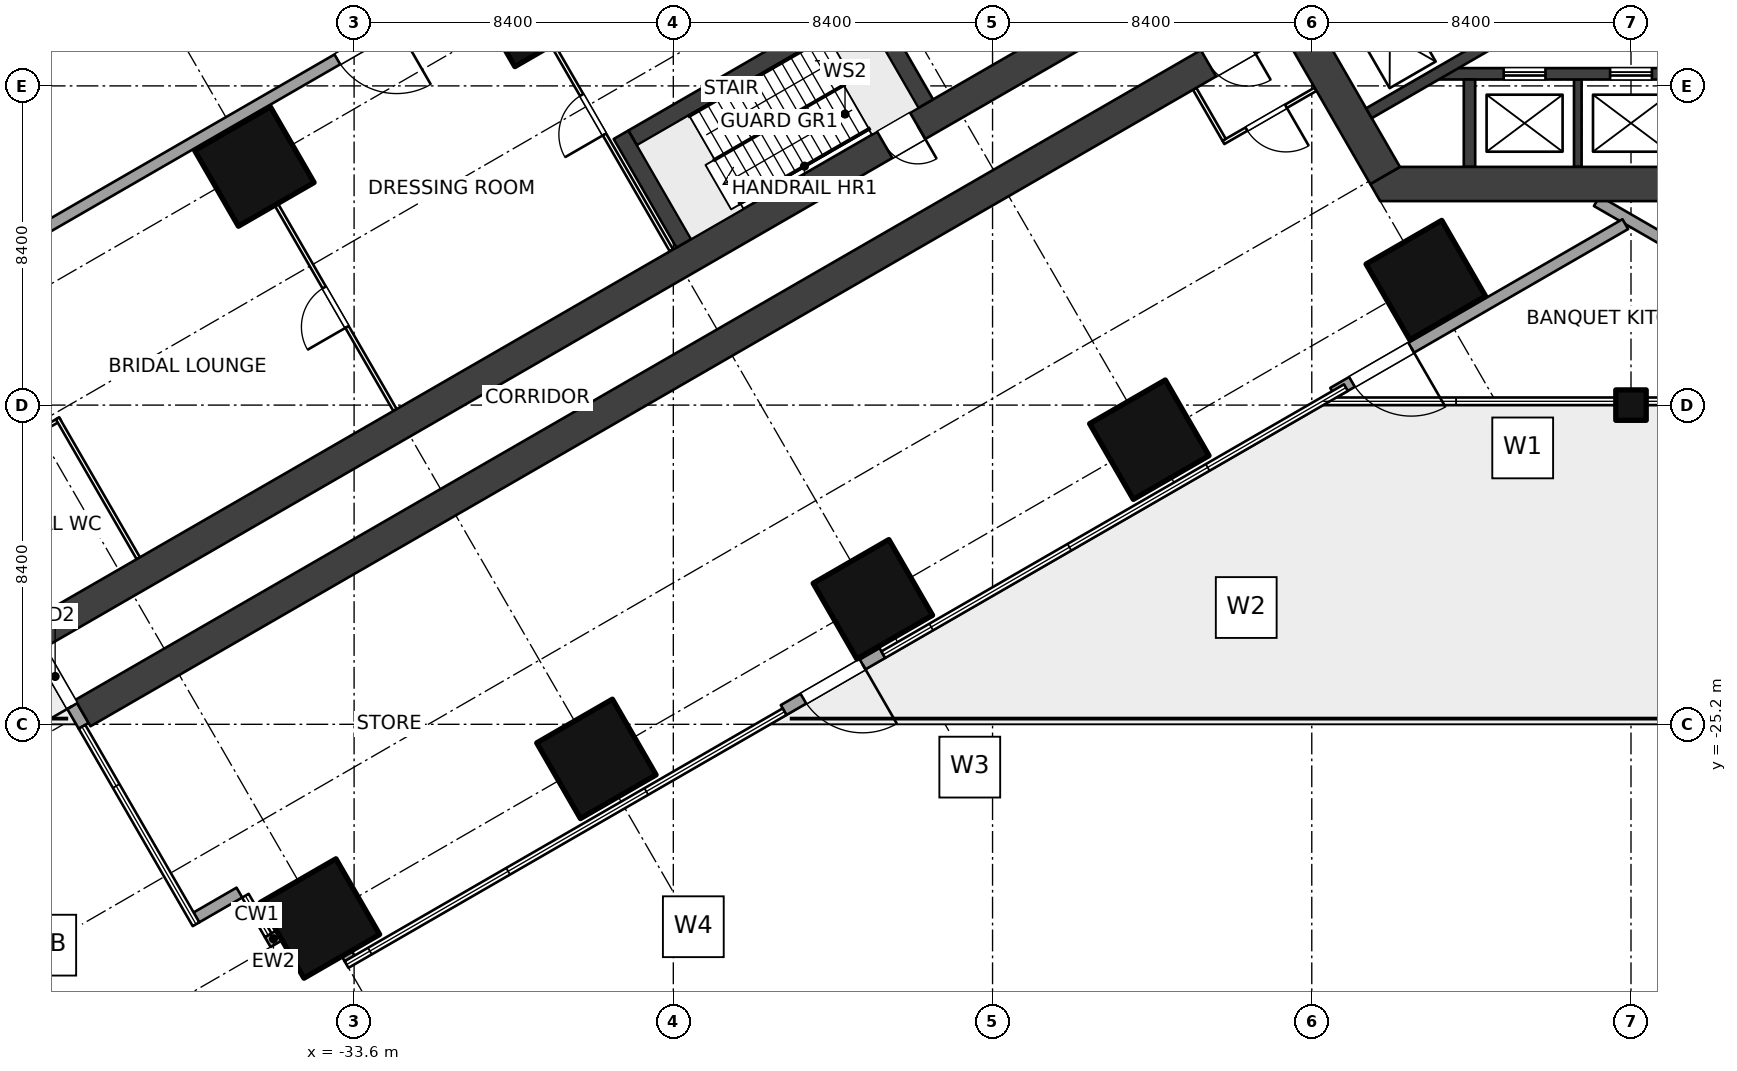
"""IFC4 building model, lengths in metres.
Left out: names, types, materials, properties, quantities, classifications, styles, units other than length and angle.
Written with IfcOpenShell. Run it as: python <this file> out.ifc"""

import sys

from ifc_helpers import new_model, si_unit, direction, frame, frame_2d, origin, origin_2d, place, context, subcontext, project, spatial, polyline, rectangle, outline, extrude, element, fill, save


model = new_model("IFC4")
c1 = context("Model", 3, precision=1e-05, world=origin(), true_north=direction((0.0, 1.0)))
c2 = subcontext(c1, "Body", "Model", "MODEL_VIEW")
j1 = project(units=[si_unit("LENGTHUNIT", "METRE"), si_unit("PLANEANGLEUNIT", "RADIAN")], contexts=[c1])
p1 = place(None, origin())
s1 = spatial("IfcSite", under=j1, at=p1, CompositionType="ELEMENT")
p2 = place(p1, origin())
s2 = spatial("IfcBuilding", under=s1, at=p2, CompositionType="ELEMENT")
p3 = place(p2, frame((0.0, 0.0, 16.0)))
s3 = spatial("IfcBuildingStorey", under=s2, at=p3, CompositionType="ELEMENT", Elevation=16.0)
for number, where, z_axis, x_axis in (
    (1, (-5.4, -13.51, 0.0), (0.0, 0.0, 1.0), (-0.5, 0.866, 0.0)),
    (2, (-12.675, -17.71, 0.0), (0.0, 0.0, 1.0), (-0.5, 0.866, 0.0)),
    (3, (-19.949, -21.91, 0.0), (0.0, 0.0, 1.0), (-0.5, 0.866, 0.0)),
    (4, (-28.949, -6.322, 0.0), (0.0, 0.0, 1.0), (-0.5, 0.866, 0.0)),
    (5, (-27.224, -26.11, 0.0), (0.0, 0.0, 1.0), (-0.5, 0.866, 0.0)),
    (6, (-36.224, -10.521, 0.0), (0.0, 0.0, 1.0), (-0.5, 0.866, 0.0)),
    (7, (-34.499, -30.31, 0.0), (0.0, 0.0, 1.0), (-0.5, 0.866, 0.0)),
):
    element("IfcColumn", number, at=place(p3, frame(where, z_axis=z_axis, x_axis=x_axis)), inside=s3, PredefinedType="COLUMN", context=c2, shape_type="SweptSolid", body=[
        extrude(rectangle(XDim=2.3, YDim=2.3, at=origin_2d()), origin(), (0.0, 0.0, 1.0), 5.0),
    ])
p4 = place(p3, frame((0.0, -16.8, 0.0), z_axis=(0.0, 0.0, 1.0), x_axis=(1.0, 0.0, 0.0)))
e8 = element("IfcColumn", 8, at=p4, inside=s3, PredefinedType="COLUMN", context=c2, shape_type="SweptSolid", body=[
    extrude(rectangle(XDim=0.8, YDim=0.8, at=origin_2d()), origin(), (0.0, 0.0, 1.0), 5.0),
])
p5 = place(p3, frame((-6.47, -10.757, 0.0), z_axis=(0.0, 0.0, 1.0), x_axis=(-0.499997612506, 0.8660267822, 0.0)))
e9 = element("IfcWall", 9, at=p5, inside=s3, PredefinedType="SHEAR", context=c2, shape_type="SweptSolid", body=[
    extrude(rectangle(XDim=12.161, YDim=0.9, at=frame_2d((6.08, 0.0))), origin(), (0.0, 0.0, 1.0), 5.0),
])
p6 = place(p5, frame((5.33, 0.0, 0.0)))
e10 = element("IfcOpeningElement", 10, at=p6, cuts=e9, PredefinedType="OPENING", context=c2, shape_type="SweptSolid", body=[
    extrude(rectangle(XDim=1.5, YDim=2.1, at=frame_2d((0.75, 1.05))), frame((0.0, 0.46, 0.0), z_axis=(0.0, -1.0, 0.0), x_axis=(1.0, 0.0, 0.0)), (0.0, 0.0, 1.0), 0.92),
])
p7 = place(p3, origin())
e11 = element("IfcWall", 11, at=p7, inside=s3, PredefinedType="SHEAR", context=c2, shape_type="SweptSolid", body=[
    extrude(outline(polyline([(-6.6, -11.432), (6.6, -11.432), (6.86, -10.981), (6.08, -10.531), (-6.08, -10.531), (-6.86, -10.981), (-6.6, -11.432)])), origin(), (0.0, 0.0, 1.0), 5.0),
])
p8 = place(p3, frame((-0.919, -5.669, 0.0), z_axis=(0.0, 0.0, 1.0), x_axis=(-0.866011800373, -0.500023561059, 0.0)))
e12 = element("IfcWall", 12, at=p8, inside=s3, PredefinedType="SHEAR", context=c2, shape_type="SweptSolid", body=[
    extrude(rectangle(XDim=6.902, YDim=0.3, at=frame_2d((3.451, 0.0))), origin(), (0.0, 0.0, 1.0), 5.0),
])
p9 = place(p3, frame((5.098, -8.082, 0.0), z_axis=(0.0, 0.0, 1.0), x_axis=(-1.0, 0.0, 0.0)))
e13 = element("IfcWall", 13, at=p9, inside=s3, PredefinedType="SHEAR", context=c2, shape_type="SweptSolid", body=[
    extrude(rectangle(XDim=10.195, YDim=0.3, at=frame_2d((5.098, 0.0))), origin(), (0.0, 0.0, 1.0), 5.0),
])
p10 = place(p9, frame((1.748, 0.0, 0.0)))
e14 = element("IfcOpeningElement", 14, at=p10, cuts=e13, PredefinedType="OPENING", context=c2, shape_type="SweptSolid", body=[
    extrude(rectangle(XDim=1.1, YDim=2.1, at=frame_2d((0.55, 1.05))), frame((0.0, 0.16, 0.0), z_axis=(0.0, -1.0, 0.0), x_axis=(1.0, 0.0, 0.0)), (0.0, 0.0, 1.0), 0.32),
])
p11 = place(p9, frame((4.548, 0.0, 0.0)))
e15 = element("IfcOpeningElement", 15, at=p11, cuts=e13, PredefinedType="OPENING", context=c2, shape_type="SweptSolid", body=[
    extrude(rectangle(XDim=1.1, YDim=2.1, at=frame_2d((0.55, 1.05))), frame((0.0, 0.16, 0.0), z_axis=(0.0, -1.0, 0.0), x_axis=(1.0, 0.0, 0.0)), (0.0, 0.0, 1.0), 0.32),
])
p12 = place(p9, frame((7.348, 0.0, 0.0)))
e16 = element("IfcOpeningElement", 16, at=p12, cuts=e13, PredefinedType="OPENING", context=c2, shape_type="SweptSolid", body=[
    extrude(rectangle(XDim=1.1, YDim=2.1, at=frame_2d((0.55, 1.05))), frame((0.0, 0.16, 0.0), z_axis=(0.0, -1.0, 0.0), x_axis=(1.0, 0.0, 0.0)), (0.0, 0.0, 1.0), 0.32),
])
p13 = place(p3, frame((-4.25, -8.231, 0.0), z_axis=(0.0, 0.0, 1.0), x_axis=(0.0, -1.0, 0.0)))
e17 = element("IfcWall", 17, at=p13, inside=s3, PredefinedType="SHEAR", context=c2, shape_type="SweptSolid", body=[
    extrude(rectangle(XDim=2.3, YDim=0.3, at=frame_2d((1.15, 0.0))), origin(), (0.0, 0.0, 1.0), 5.0),
])
p14 = place(p3, frame((-1.4, -8.231, 0.0), z_axis=(0.0, 0.0, 1.0), x_axis=(0.0, -1.0, 0.0)))
e18 = element("IfcWall", 18, at=p14, inside=s3, PredefinedType="SHEAR", context=c2, shape_type="SweptSolid", body=[
    extrude(rectangle(XDim=2.3, YDim=0.2, at=frame_2d((1.15, 0.0))), origin(), (0.0, 0.0, 1.0), 5.0),
])
p15 = place(p3, frame((-8.91, -6.53, 0.0), z_axis=(0.0, 0.0, 1.0), x_axis=(-0.866025284237, -0.500000207062, 0.0)))
e19 = element("IfcWall", 19, at=p15, inside=s3, PredefinedType="SHEAR", context=c2, shape_type="SweptSolid", body=[
    extrude(rectangle(XDim=36.75, YDim=0.8, at=frame_2d((18.375, 0.0))), origin(), (0.0, 0.0, 1.0), 5.0),
])
p16 = place(p15, frame((1.35, 0.0, 0.0)))
e20 = element("IfcOpeningElement", 20, at=p16, cuts=e19, PredefinedType="OPENING", context=c2, shape_type="SweptSolid", body=[
    extrude(rectangle(XDim=1.2, YDim=2.1, at=frame_2d((0.6, 1.05))), frame((0.0, 0.41, 0.0), z_axis=(0.0, -1.0, 0.0), x_axis=(1.0, 0.0, 0.0)), (0.0, 0.0, 1.0), 0.82),
])
p17 = place(p3, frame((-10.11, -4.451, 0.0), z_axis=(0.0, 0.0, 1.0), x_axis=(-0.866025284237, -0.500000207062, 0.0)))
e21 = element("IfcWall", 21, at=p17, inside=s3, PredefinedType="SHEAR", context=c2, shape_type="SweptSolid", body=[
    extrude(rectangle(XDim=36.75, YDim=0.8, at=frame_2d((18.375, 0.0))), origin(), (0.0, 0.0, 1.0), 5.0),
])
p18 = place(p17, frame((10.0, 0.0, 0.0)))
e22 = element("IfcOpeningElement", 22, at=p18, cuts=e21, PredefinedType="OPENING", context=c2, shape_type="SweptSolid", body=[
    extrude(rectangle(XDim=1.0, YDim=2.1, at=frame_2d((0.5, 1.05))), frame((0.0, 0.41, 0.0), z_axis=(0.0, -1.0, 0.0), x_axis=(1.0, 0.0, 0.0)), (0.0, 0.0, 1.0), 0.82),
])
p19 = place(p17, frame((2.85, 0.0, 0.0)))
e23 = element("IfcOpeningElement", 23, at=p19, cuts=e21, PredefinedType="OPENING", context=c2, shape_type="SweptSolid", body=[
    extrude(rectangle(XDim=1.2, YDim=2.1, at=frame_2d((0.6, 1.05))), frame((0.0, 0.41, 0.0), z_axis=(0.0, -1.0, 0.0), x_axis=(1.0, 0.0, 0.0)), (0.0, 0.0, 1.0), 0.82),
])
p20 = place(p3, frame((-35.572, -30.757, 0.0), z_axis=(0.0, 0.0, 1.0), x_axis=(-0.865939549016, -0.500148675346, 0.0)))
e24 = element("IfcWall", 24, at=p20, inside=s3, PredefinedType="SOLIDWALL", context=c2, shape_type="SweptSolid", body=[
    extrude(rectangle(XDim=0.347, YDim=0.3, at=frame_2d((0.174, 0.0))), origin(), (0.0, 0.0, 1.0), 4.7),
])
p21 = place(p3, frame((-36.618, -29.629, 0.0), z_axis=(0.0, 0.0, 1.0), x_axis=(-0.866101796549, -0.4998676605, 0.0)))
e25 = element("IfcWall", 25, at=p21, inside=s3, PredefinedType="SOLIDWALL", context=c2, shape_type="SweptSolid", body=[
    extrude(rectangle(XDim=1.31, YDim=0.3, at=frame_2d((0.655, 0.0))), origin(), (0.0, 0.0, 1.0), 4.7),
])
p22 = place(p3, frame((-40.717, -25.24, 0.0), z_axis=(0.0, 0.0, 1.0), x_axis=(-0.50002537861, 0.866010750942, 0.0)))
e26 = element("IfcWall", 26, at=p22, inside=s3, PredefinedType="SOLIDWALL", context=c2, shape_type="SweptSolid", body=[
    extrude(rectangle(XDim=3.0, YDim=0.3, at=frame_2d((1.5, 0.0))), origin(), (0.0, 0.0, 1.0), 4.7),
])
p23 = place(p22, frame((0.6, 0.0, 0.0)))
e27 = element("IfcOpeningElement", 27, at=p23, cuts=e26, PredefinedType="OPENING", context=c2, shape_type="SweptSolid", body=[
    extrude(rectangle(XDim=1.8, YDim=2.4, at=frame_2d((0.9, 1.2))), frame((0.0, 0.16, 0.0), z_axis=(0.0, -1.0, 0.0), x_axis=(1.0, 0.0, 0.0)), (0.0, 0.0, 1.0), 0.32),
])
p24 = place(p3, frame((-19.699, -23.325, 0.0), z_axis=(0.0, 0.0, 1.0), x_axis=(-0.866031096941, -0.499990139034, 0.0)))
e28 = element("IfcWall", 28, at=p24, inside=s3, PredefinedType="SOLIDWALL", context=c2, shape_type="SweptSolid", body=[
    extrude(rectangle(XDim=3.0, YDim=0.3, at=frame_2d((1.5, 0.0))), origin(), (0.0, 0.0, 1.0), 4.7),
])
p25 = place(p24, frame((0.6, 0.0, 0.0)))
e29 = element("IfcOpeningElement", 29, at=p25, cuts=e28, PredefinedType="OPENING", context=c2, shape_type="SweptSolid", body=[
    extrude(rectangle(XDim=1.8, YDim=2.4, at=frame_2d((0.9, 1.2))), frame((0.0, 0.16, 0.0), z_axis=(0.0, -1.0, 0.0), x_axis=(1.0, 0.0, 0.0)), (0.0, 0.0, 1.0), 0.32),
])
p26 = place(p3, frame((-33.716, -31.365, 0.0), z_axis=(0.0, 0.0, 1.0), x_axis=(-0.499953773667, 0.866052090925, 0.0)))
e30 = element("IfcWall", 30, at=p26, inside=s3, PredefinedType="SOLIDWALL", context=c2, shape_type="SweptSolid", body=[
    extrude(rectangle(XDim=1.005, YDim=0.3, at=frame_2d((0.502, 0.0))), origin(), (0.0, 0.0, 1.0), 4.7),
])
p27 = place(p3, frame((-8.3, -8.487, 0.0), z_axis=(0.0, 0.0, 1.0), x_axis=(-0.866034573852, -0.49998411664, 0.0)))
e31 = element("IfcWall", 31, at=p27, inside=s3, PredefinedType="PARTITIONING", context=c2, shape_type="SweptSolid", body=[
    extrude(rectangle(XDim=2.8, YDim=0.1, at=frame_2d((1.4, 0.0))), origin(), (0.0, 0.0, 1.0), 4.7),
])
p28 = place(p27, frame((0.9, 0.0, 0.0)))
e32 = element("IfcOpeningElement", 32, at=p28, cuts=e31, PredefinedType="OPENING", context=c2, shape_type="SweptSolid", body=[
    extrude(rectangle(XDim=1.2, YDim=2.1, at=frame_2d((0.6, 1.05))), frame((0.0, 0.06, 0.0), z_axis=(0.0, -1.0, 0.0), x_axis=(1.0, 0.0, 0.0)), (0.0, 0.0, 1.0), 0.12),
])
p29 = place(p3, frame((-11.482, -8.476, 0.0), z_axis=(0.0, 0.0, 1.0), x_axis=(0.500017819788, -0.86601511528, 0.0)))
e33 = element("IfcWall", 33, at=p29, inside=s3, PredefinedType="PARTITIONING", context=c2, shape_type="SweptSolid", body=[
    extrude(rectangle(XDim=1.55, YDim=0.1, at=frame_2d((0.775, 0.0))), origin(), (0.0, 0.0, 1.0), 4.7),
])
p30 = place(p3, frame((-25.249, -12.73, 0.0), z_axis=(0.0, 0.0, 1.0), x_axis=(-0.499987320047, 0.866032724435, 0.0)))
e34 = element("IfcWall", 34, at=p30, inside=s3, PredefinedType="PARTITIONING", context=c2, shape_type="SweptSolid", body=[
    extrude(rectangle(XDim=6.25, YDim=0.1, at=frame_2d((3.125, 0.0))), origin(), (0.0, 0.0, 1.0), 2.9),
])
p31 = place(p30, frame((3.525, 0.0, 0.0)))
e35 = element("IfcOpeningElement", 35, at=p31, cuts=e34, PredefinedType="OPENING", context=c2, shape_type="SweptSolid", body=[
    extrude(rectangle(XDim=1.2, YDim=2.1, at=frame_2d((0.6, 1.05))), frame((0.0, 0.06, 0.0), z_axis=(0.0, -1.0, 0.0), x_axis=(1.0, 0.0, 0.0)), (0.0, 0.0, 1.0), 0.12),
])
p32 = place(p3, frame((-32.524, -16.93, 0.0), z_axis=(0.0, 0.0, 1.0), x_axis=(-0.500004234368, 0.866022959057, 0.0)))
e36 = element("IfcWall", 36, at=p32, inside=s3, PredefinedType="PARTITIONING", context=c2, shape_type="SweptSolid", body=[
    extrude(rectangle(XDim=6.25, YDim=0.1, at=frame_2d((3.125, 0.0))), origin(), (0.0, 0.0, 1.0), 2.9),
])
p33 = place(p32, frame((2.525, 0.0, 0.0)))
e37 = element("IfcOpeningElement", 37, at=p33, cuts=e36, PredefinedType="OPENING", context=c2, shape_type="SweptSolid", body=[
    extrude(rectangle(XDim=1.2, YDim=2.1, at=frame_2d((0.6, 1.05))), frame((0.0, 0.06, 0.0), z_axis=(0.0, -1.0, 0.0), x_axis=(1.0, 0.0, 0.0)), (0.0, 0.0, 1.0), 0.12),
])
p34 = place(p3, frame((-41.335, -17.168, 0.0), z_axis=(0.0, 0.0, 1.0), x_axis=(-0.866020032806, -0.500009302692, 0.0)))
e38 = element("IfcWall", 38, at=p34, inside=s3, PredefinedType="PARTITIONING", context=c2, shape_type="SweptSolid", body=[
    extrude(rectangle(XDim=3.487, YDim=0.1, at=frame_2d((1.744, 0.0))), origin(), (0.0, 0.0, 1.0), 4.7),
])
p35 = place(p34, frame((1.4, 0.0, 0.0)))
e39 = element("IfcOpeningElement", 39, at=p35, cuts=e38, PredefinedType="OPENING", context=c2, shape_type="SweptSolid", body=[
    extrude(rectangle(XDim=0.9, YDim=2.1, at=frame_2d((0.45, 1.05))), frame((0.0, 0.06, 0.0), z_axis=(0.0, -1.0, 0.0), x_axis=(1.0, 0.0, 0.0)), (0.0, 0.0, 1.0), 0.12),
])
p36 = place(p3, frame((-39.279, -20.83, 0.0), z_axis=(0.0, 0.0, 1.0), x_axis=(-0.499994284652, 0.866028703517, 0.0)))
e40 = element("IfcWall", 40, at=p36, inside=s3, PredefinedType="PARTITIONING", context=c2, shape_type="SweptSolid", body=[
    extrude(rectangle(XDim=4.25, YDim=0.1, at=frame_2d((2.125, 0.0))), origin(), (0.0, 0.0, 1.0), 2.9),
])
p37 = place(p3, frame((-0.15, -12.038, 0.0), z_axis=(0.0, 0.0, 1.0), x_axis=(-0.866033104117, -0.499986662396, 0.0)))
e41 = element("IfcWall", 41, at=p37, inside=s3, PredefinedType="SOLIDWALL", context=c2, shape_type="SweptSolid", body=[
    extrude(rectangle(XDim=8.879, YDim=0.3, at=frame_2d((4.439, 0.0))), origin(), (0.0, 0.0, 1.0), 4.7),
])
p38 = place(p37, frame((6.504, 0.0, 0.0)))
e42 = element("IfcOpeningElement", 42, at=p38, cuts=e41, PredefinedType="OPENING", context=c2, shape_type="SweptSolid", body=[
    extrude(rectangle(XDim=1.8, YDim=2.4, at=frame_2d((0.9, 1.2))), frame((0.0, 0.16, 0.0), z_axis=(0.0, -1.0, 0.0), x_axis=(1.0, 0.0, 0.0)), (0.0, 0.0, 1.0), 0.32),
])
p39 = place(p3, frame((-9.45, 6.495, 0.0), z_axis=(0.0, 0.0, 1.0), x_axis=(-0.866025301493, -0.500000177174, 0.0)))
e43 = element("IfcWall", 43, at=p39, inside=s3, PredefinedType="SOLIDWALL", context=c2, shape_type="SweptSolid", body=[
    extrude(rectangle(XDim=43.095, YDim=0.3, at=frame_2d((21.548, 0.0))), origin(), (0.0, 0.0, 1.0), 4.7),
])
p40 = place(p39, frame((26.595, 0.0, 0.0)))
e44 = element("IfcOpeningElement", 44, at=p40, cuts=e43, PredefinedType="OPENING", context=c2, shape_type="SweptSolid", body=[
    extrude(rectangle(XDim=1.8, YDim=2.4, at=frame_2d((0.9, 1.2))), frame((0.0, 0.16, 0.0), z_axis=(0.0, -1.0, 0.0), x_axis=(1.0, 0.0, 0.0)), (0.0, 0.0, 1.0), 0.32),
])
p41 = place(p3, frame((-0.9, -11.432, 0.0), z_axis=(0.0, 0.0, 1.0), x_axis=(0.866022359356, -0.500005273068, 0.0)))
e45 = element("IfcWall", 45, at=p41, inside=s3, PredefinedType="SOLIDWALL", context=c2, shape_type="SweptSolid", body=[
    extrude(rectangle(XDim=10.337, YDim=0.3, at=frame_2d((5.168, 0.0))), origin(), (0.0, 0.0, 1.0), 4.7),
])
p42 = place(p41, frame((7.717, 0.0, 0.0)))
e46 = element("IfcOpeningElement", 46, at=p42, cuts=e45, PredefinedType="OPENING", context=c2, shape_type="SweptSolid", body=[
    extrude(rectangle(XDim=1.8, YDim=2.4, at=frame_2d((0.9, 1.2))), frame((0.0, 0.16, 0.0), z_axis=(0.0, -1.0, 0.0), x_axis=(1.0, 0.0, 0.0)), (0.0, 0.0, 1.0), 0.32),
])
for number, where, z_axis, x_axis in (
    (47, (-18.559, -8.868, 0.0), (0.0, 0.0, 1.0), (-0.5, 0.866, 0.0)),
    (48, (-24.925, -12.543, 0.0), (0.0, 0.0, 1.0), (-0.5, 0.866, 0.0)),
):
    element("IfcWall", number, at=place(p3, frame(where, z_axis=z_axis, x_axis=x_axis)), inside=s3, PredefinedType="SOLIDWALL", context=c2, shape_type="SweptSolid", body=[
        extrude(rectangle(XDim=3.3, YDim=0.45, at=frame_2d((1.65, 0.0))), origin(), (0.0, 0.0, 1.0), 5.0),
    ])
p43 = place(p3, frame((-20.292, -6.317, 0.0), z_axis=(0.0, 0.0, 1.0), x_axis=(-0.866028853923, -0.499994024137, 0.0)))
e49 = element("IfcWall", 49, at=p43, inside=s3, PredefinedType="SOLIDWALL", context=c2, shape_type="SweptSolid", body=[
    extrude(rectangle(XDim=6.9, YDim=0.45, at=frame_2d((3.45, 0.0))), origin(), (0.0, 0.0, 1.0), 5.0),
])
p44 = place(p23, origin())
e50 = element("IfcDoor", 50, at=p44, inside=s3, OperationType="DOUBLE_DOOR_SINGLE_SWING", PredefinedType="DOOR", context=c2, shape_type="SweptSolid", body=[
    extrude(rectangle(XDim=1.8, YDim=2.4, at=frame_2d((0.9, 1.2))), frame((0.0, 0.025, 0.0), z_axis=(0.0, -1.0, 0.0), x_axis=(1.0, 0.0, 0.0)), (0.0, 0.0, 1.0), 0.05),
])
fill(e27, e50)
p45 = place(p25, origin())
e51 = element("IfcDoor", 51, at=p45, inside=s3, OperationType="DOUBLE_DOOR_SINGLE_SWING", PredefinedType="DOOR", context=c2, shape_type="SweptSolid", body=[
    extrude(rectangle(XDim=1.8, YDim=2.4, at=frame_2d((0.9, 1.2))), frame((0.0, 0.025, 0.0), z_axis=(0.0, -1.0, 0.0), x_axis=(1.0, 0.0, 0.0)), (0.0, 0.0, 1.0), 0.05),
])
fill(e29, e51)
p46 = place(p11, origin())
e52 = element("IfcDoor", 52, at=p46, inside=s3, OperationType="DOUBLE_DOOR_SLIDING", PredefinedType="DOOR", context=c2, shape_type="SweptSolid", body=[
    extrude(rectangle(XDim=1.1, YDim=2.1, at=frame_2d((0.55, 1.05))), frame((0.0, 0.025, 0.0), z_axis=(0.0, -1.0, 0.0), x_axis=(1.0, 0.0, 0.0)), (0.0, 0.0, 1.0), 0.05),
])
fill(e15, e52)
p47 = place(p12, origin())
e53 = element("IfcDoor", 53, at=p47, inside=s3, OperationType="DOUBLE_DOOR_SLIDING", PredefinedType="DOOR", context=c2, shape_type="SweptSolid", body=[
    extrude(rectangle(XDim=1.1, YDim=2.1, at=frame_2d((0.55, 1.05))), frame((0.0, 0.025, 0.0), z_axis=(0.0, -1.0, 0.0), x_axis=(1.0, 0.0, 0.0)), (0.0, 0.0, 1.0), 0.05),
])
fill(e16, e53)
p48 = place(p18, origin())
e54 = element("IfcDoor", 54, at=p48, inside=s3, OperationType="SINGLE_SWING_LEFT", PredefinedType="DOOR", context=c2, shape_type="SweptSolid", body=[
    extrude(rectangle(XDim=1.0, YDim=2.1, at=frame_2d((0.5, 1.05))), frame((0.0, 0.025, 0.0), z_axis=(0.0, -1.0, 0.0), x_axis=(1.0, 0.0, 0.0)), (0.0, 0.0, 1.0), 0.05),
])
fill(e22, e54)
p49 = place(p16, origin())
e55 = element("IfcDoor", 55, at=p49, inside=s3, OperationType="DOUBLE_SWING_LEFT", PredefinedType="DOOR", context=c2, shape_type="SweptSolid", body=[
    extrude(rectangle(XDim=1.2, YDim=2.1, at=frame_2d((0.6, 1.05))), frame((0.0, 0.025, 0.0), z_axis=(0.0, -1.0, 0.0), x_axis=(1.0, 0.0, 0.0)), (0.0, 0.0, 1.0), 0.05),
])
fill(e20, e55)
p50 = place(p28, origin())
e56 = element("IfcDoor", 56, at=p50, inside=s3, OperationType="DOUBLE_SWING_LEFT", PredefinedType="DOOR", context=c2, shape_type="SweptSolid", body=[
    extrude(rectangle(XDim=1.2, YDim=2.1, at=frame_2d((0.6, 1.05))), frame((0.0, 0.025, 0.0), z_axis=(0.0, -1.0, 0.0), x_axis=(1.0, 0.0, 0.0)), (0.0, 0.0, 1.0), 0.05),
])
fill(e32, e56)
p51 = place(p31, origin())
e57 = element("IfcDoor", 57, at=p51, inside=s3, OperationType="DOUBLE_SWING_LEFT", PredefinedType="DOOR", context=c2, shape_type="SweptSolid", body=[
    extrude(rectangle(XDim=1.2, YDim=2.1, at=frame_2d((0.6, 1.05))), frame((0.0, 0.025, 0.0), z_axis=(0.0, -1.0, 0.0), x_axis=(1.0, 0.0, 0.0)), (0.0, 0.0, 1.0), 0.05),
])
fill(e35, e57)
p52 = place(p33, origin())
e58 = element("IfcDoor", 58, at=p52, inside=s3, OperationType="DOUBLE_SWING_LEFT", PredefinedType="DOOR", context=c2, shape_type="SweptSolid", body=[
    extrude(rectangle(XDim=1.2, YDim=2.1, at=frame_2d((0.6, 1.05))), frame((0.0, 0.025, 0.0), z_axis=(0.0, -1.0, 0.0), x_axis=(1.0, 0.0, 0.0)), (0.0, 0.0, 1.0), 0.05),
])
fill(e37, e58)
p53 = place(p38, origin())
e59 = element("IfcDoor", 59, at=p53, inside=s3, OperationType="DOUBLE_DOOR_DOUBLE_SWING", PredefinedType="DOOR", context=c2, shape_type="SweptSolid", body=[
    extrude(rectangle(XDim=1.8, YDim=2.4, at=frame_2d((0.9, 1.2))), frame((0.0, 0.025, 0.0), z_axis=(0.0, -1.0, 0.0), x_axis=(1.0, 0.0, 0.0)), (0.0, 0.0, 1.0), 0.05),
])
fill(e42, e59)
p54 = place(p40, origin())
e60 = element("IfcDoor", 60, at=p54, inside=s3, OperationType="DOUBLE_DOOR_DOUBLE_SWING", PredefinedType="DOOR", context=c2, shape_type="SweptSolid", body=[
    extrude(rectangle(XDim=1.8, YDim=2.4, at=frame_2d((0.9, 1.2))), frame((0.0, 0.025, 0.0), z_axis=(0.0, -1.0, 0.0), x_axis=(1.0, 0.0, 0.0)), (0.0, 0.0, 1.0), 0.05),
])
fill(e44, e60)
save(model, sys.argv[1])
